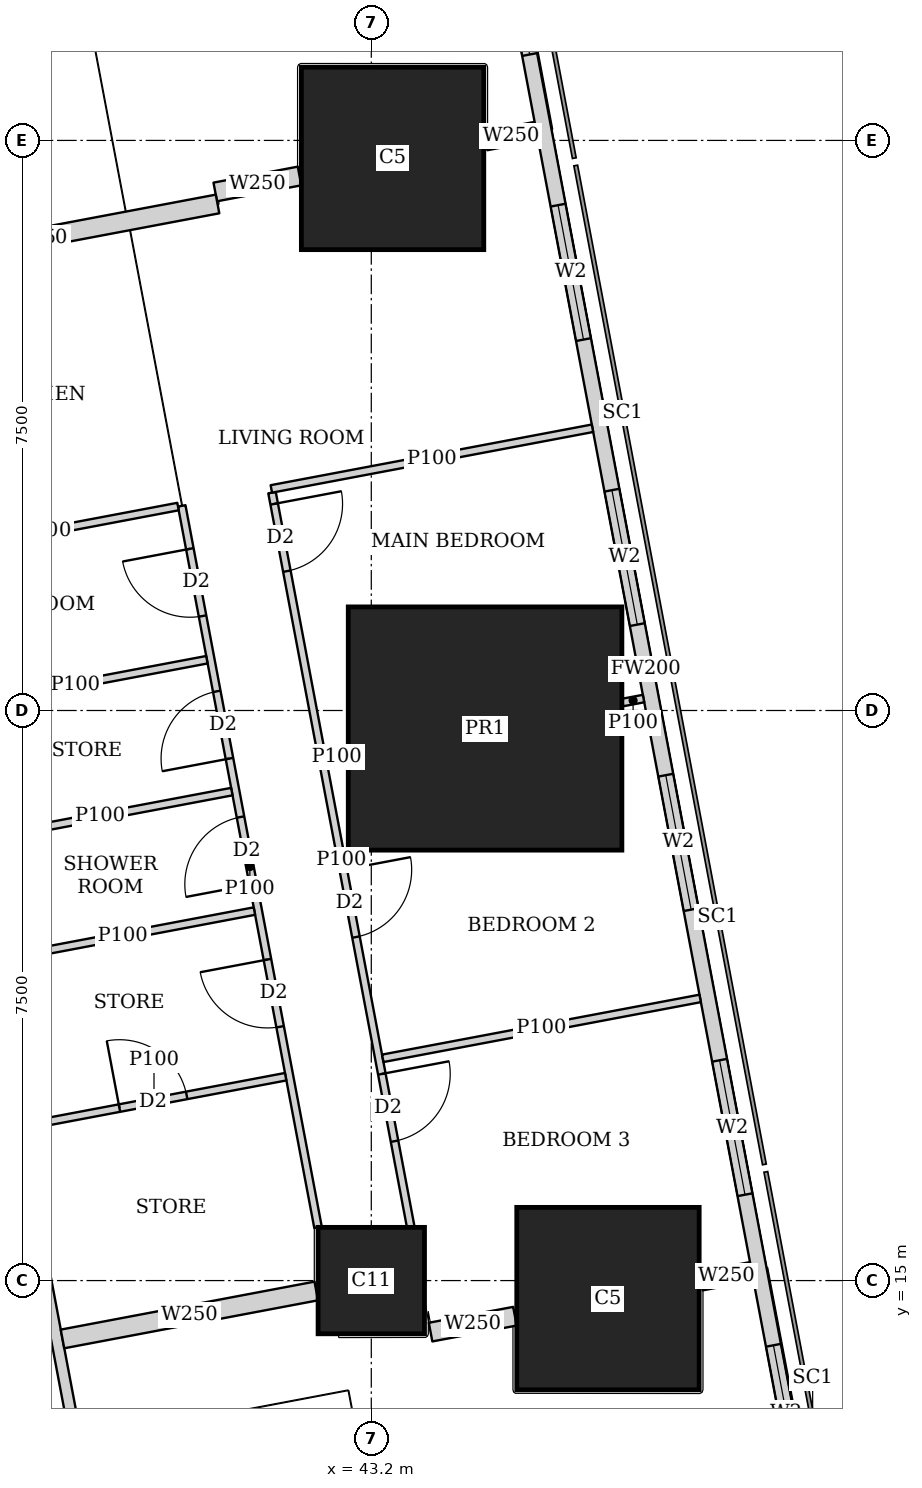
"""IFC4 building model, lengths in metres.
Left out: names, types, materials, properties, quantities, classifications, styles, units other than length and angle.
Written with IfcOpenShell. Run it as: python <this file> out.ifc"""

import sys

from ifc_helpers import new_model, si_unit, direction, frame, frame_2d, origin, origin_2d, place, context, subcontext, project, spatial, rectangle, extrude, element, fill, save


model = new_model("IFC4")
c1 = context("Model", 3, precision=1e-05, world=origin(), true_north=direction((0.0, 1.0)))
c2 = subcontext(c1, "Body", "Model", "MODEL_VIEW")
j1 = project(units=[si_unit("LENGTHUNIT", "METRE"), si_unit("PLANEANGLEUNIT", "RADIAN")], contexts=[c1])
p1 = place(None, origin())
s1 = spatial("IfcSite", under=j1, at=p1, CompositionType="ELEMENT")
p2 = place(p1, origin())
s2 = spatial("IfcBuilding", under=s1, at=p2, CompositionType="ELEMENT")
p3 = place(p2, frame((0.0, 0.0, 204.95)))
s3 = spatial("IfcBuildingStorey", under=s2, at=p3, CompositionType="ELEMENT", Elevation=204.95)
p4 = place(p3, frame((43.2, 15.0, 0.0), z_axis=(0.0, 0.0, 1.0), x_axis=(1.0, 0.0, 0.0)))
e1 = element("IfcColumn", 1, at=p4, inside=s3, PredefinedType="COLUMN", context=c2, shape_type="SweptSolid", body=[
    extrude(rectangle(XDim=1.4, YDim=1.4, at=origin_2d()), origin(), (0.0, 0.0, 1.0), 3.75),
])
p5 = place(p3, frame((46.314, 14.763, 0.0), z_axis=(0.0, 0.0, 1.0), x_axis=(1.0, 0.0, 0.0)))
e2 = element("IfcColumn", 2, at=p5, inside=s3, PredefinedType="COLUMN", context=c2, shape_type="SweptSolid", body=[
    extrude(rectangle(XDim=2.4, YDim=2.4, at=origin_2d()), origin(), (0.0, 0.0, 1.0), 3.75),
])
p6 = place(p3, frame((44.697, 22.263, 0.0), z_axis=(0.0, 0.0, 1.0), x_axis=(1.0, 0.0, 0.0)))
e3 = element("IfcColumn", 3, at=p6, inside=s3, PredefinedType="COLUMN", context=c2, shape_type="SweptSolid", body=[
    extrude(rectangle(XDim=3.6, YDim=3.2, at=origin_2d()), origin(), (0.0, 0.0, 1.0), 3.75),
])
p7 = place(p3, frame((43.48, 29.763, 0.0), z_axis=(0.0, 0.0, 1.0), x_axis=(1.0, 0.0, 0.0)))
e4 = element("IfcColumn", 4, at=p7, inside=s3, PredefinedType="COLUMN", context=c2, shape_type="SweptSolid", body=[
    extrude(rectangle(XDim=2.4, YDim=2.4, at=origin_2d()), origin(), (0.0, 0.0, 1.0), 3.75),
])
p8 = place(p3, frame((50.653, 2.703, 0.0), z_axis=(0.0, 0.0, 1.0), x_axis=(-0.185612026696, 0.982623109613, 0.0)))
e5 = element("IfcWall", 5, at=p8, inside=s3, PredefinedType="SOLIDWALL", context=c2, shape_type="SweptSolid", body=[
    extrude(rectangle(XDim=41.393, YDim=0.2, at=frame_2d((20.697, 0.0))), origin(), (0.0, 0.0, 1.0), 3.5),
])
p9 = place(p8, frame((1.633, 0.0, 0.9)))
e6 = element("IfcOpeningElement", 6, at=p9, cuts=e5, PredefinedType="OPENING", context=c2, shape_type="SweptSolid", body=[
    extrude(rectangle(XDim=1.8, YDim=1.5, at=frame_2d((0.9, 0.75))), frame((0.0, 0.11, 0.0), z_axis=(0.0, -1.0, 0.0), x_axis=(1.0, 0.0, 0.0)), (0.0, 0.0, 1.0), 0.22),
])
p10 = place(p8, frame((6.032, 0.0, 0.9)))
e7 = element("IfcOpeningElement", 7, at=p10, cuts=e5, PredefinedType="OPENING", context=c2, shape_type="SweptSolid", body=[
    extrude(rectangle(XDim=1.8, YDim=1.5, at=frame_2d((0.9, 0.75))), frame((0.0, 0.11, 0.0), z_axis=(0.0, -1.0, 0.0), x_axis=(1.0, 0.0, 0.0)), (0.0, 0.0, 1.0), 0.22),
])
p11 = place(p8, frame((9.848, 0.0, 0.9)))
e8 = element("IfcOpeningElement", 8, at=p11, cuts=e5, PredefinedType="OPENING", context=c2, shape_type="SweptSolid", body=[
    extrude(rectangle(XDim=1.8, YDim=1.5, at=frame_2d((0.9, 0.75))), frame((0.0, 0.11, 0.0), z_axis=(0.0, -1.0, 0.0), x_axis=(1.0, 0.0, 0.0)), (0.0, 0.0, 1.0), 0.22),
])
p12 = place(p8, frame((13.664, 0.0, 0.9)))
e9 = element("IfcOpeningElement", 9, at=p12, cuts=e5, PredefinedType="OPENING", context=c2, shape_type="SweptSolid", body=[
    extrude(rectangle(XDim=1.8, YDim=1.5, at=frame_2d((0.9, 0.75))), frame((0.0, 0.11, 0.0), z_axis=(0.0, -1.0, 0.0), x_axis=(1.0, 0.0, 0.0)), (0.0, 0.0, 1.0), 0.22),
])
p13 = place(p8, frame((17.481, 0.0, 0.9)))
e10 = element("IfcOpeningElement", 10, at=p13, cuts=e5, PredefinedType="OPENING", context=c2, shape_type="SweptSolid", body=[
    extrude(rectangle(XDim=1.8, YDim=1.5, at=frame_2d((0.9, 0.75))), frame((0.0, 0.11, 0.0), z_axis=(0.0, -1.0, 0.0), x_axis=(1.0, 0.0, 0.0)), (0.0, 0.0, 1.0), 0.22),
])
p14 = place(p8, frame((21.297, 0.0, 0.9)))
e11 = element("IfcOpeningElement", 11, at=p14, cuts=e5, PredefinedType="OPENING", context=c2, shape_type="SweptSolid", body=[
    extrude(rectangle(XDim=1.8, YDim=1.5, at=frame_2d((0.9, 0.75))), frame((0.0, 0.11, 0.0), z_axis=(0.0, -1.0, 0.0), x_axis=(1.0, 0.0, 0.0)), (0.0, 0.0, 1.0), 0.22),
])
p15 = place(p8, frame((25.113, 0.0, 0.9)))
e12 = element("IfcOpeningElement", 12, at=p15, cuts=e5, PredefinedType="OPENING", context=c2, shape_type="SweptSolid", body=[
    extrude(rectangle(XDim=1.8, YDim=1.5, at=frame_2d((0.9, 0.75))), frame((0.0, 0.11, 0.0), z_axis=(0.0, -1.0, 0.0), x_axis=(1.0, 0.0, 0.0)), (0.0, 0.0, 1.0), 0.22),
])
p16 = place(p8, frame((28.93, 0.0, 0.9)))
e13 = element("IfcOpeningElement", 13, at=p16, cuts=e5, PredefinedType="OPENING", context=c2, shape_type="SweptSolid", body=[
    extrude(rectangle(XDim=1.8, YDim=1.5, at=frame_2d((0.9, 0.75))), frame((0.0, 0.11, 0.0), z_axis=(0.0, -1.0, 0.0), x_axis=(1.0, 0.0, 0.0)), (0.0, 0.0, 1.0), 0.22),
])
p17 = place(p8, frame((32.746, 0.0, 0.9)))
e14 = element("IfcOpeningElement", 14, at=p17, cuts=e5, PredefinedType="OPENING", context=c2, shape_type="SweptSolid", body=[
    extrude(rectangle(XDim=1.8, YDim=1.5, at=frame_2d((0.9, 0.75))), frame((0.0, 0.11, 0.0), z_axis=(0.0, -1.0, 0.0), x_axis=(1.0, 0.0, 0.0)), (0.0, 0.0, 1.0), 0.22),
])
p18 = place(p8, frame((36.481, 0.0, 0.9)))
e15 = element("IfcOpeningElement", 15, at=p18, cuts=e5, PredefinedType="OPENING", context=c2, shape_type="SweptSolid", body=[
    extrude(rectangle(XDim=1.8, YDim=1.5, at=frame_2d((0.9, 0.75))), frame((0.0, 0.11, 0.0), z_axis=(0.0, -1.0, 0.0), x_axis=(1.0, 0.0, 0.0)), (0.0, 0.0, 1.0), 0.22),
])
p19 = place(p3, frame((33.68, 42.723, 0.0), z_axis=(0.0, 0.0, 1.0), x_axis=(0.185601160014, -0.982625162207, 0.0)))
e16 = element("IfcWall", 16, at=p19, inside=s3, PredefinedType="SOLIDWALL", context=c2, shape_type="SweptSolid", body=[
    extrude(rectangle(XDim=41.051, YDim=0.15, at=frame_2d((20.526, 0.0))), origin(), (0.0, 0.0, 1.0), 2.5),
])
p20 = place(p19, frame((12.307, 0.0, 0.0)))
e17 = element("IfcOpeningElement", 17, at=p20, cuts=e16, PredefinedType="OPENING", context=c2, shape_type="SweptSolid", body=[
    extrude(rectangle(XDim=1.0, YDim=2.1, at=frame_2d((0.5, 1.05))), frame((0.0, 0.085, 0.0), z_axis=(0.0, -1.0, 0.0), x_axis=(1.0, 0.0, 0.0)), (0.0, 0.0, 1.0), 0.17),
])
p21 = place(p19, frame((16.123, 0.0, 0.0)))
e18 = element("IfcOpeningElement", 18, at=p21, cuts=e16, PredefinedType="OPENING", context=c2, shape_type="SweptSolid", body=[
    extrude(rectangle(XDim=1.0, YDim=2.1, at=frame_2d((0.5, 1.05))), frame((0.0, 0.085, 0.0), z_axis=(0.0, -1.0, 0.0), x_axis=(1.0, 0.0, 0.0)), (0.0, 0.0, 1.0), 0.17),
])
p22 = place(p19, frame((30.902, 0.0, 0.0)))
e19 = element("IfcOpeningElement", 19, at=p22, cuts=e16, PredefinedType="OPENING", context=c2, shape_type="SweptSolid", body=[
    extrude(rectangle(XDim=1.0, YDim=2.1, at=frame_2d((0.5, 1.05))), frame((0.0, 0.085, 0.0), z_axis=(0.0, -1.0, 0.0), x_axis=(1.0, 0.0, 0.0)), (0.0, 0.0, 1.0), 0.17),
])
p23 = place(p3, frame((41.894, 25.366, 0.0), z_axis=(0.0, 0.0, 1.0), x_axis=(0.185612905165, -0.982622943675, 0.0)))
e20 = element("IfcWall", 20, at=p23, inside=s3, PredefinedType="PARTITIONING", context=c2, shape_type="SweptSolid", body=[
    extrude(rectangle(XDim=9.827, YDim=0.1, at=frame_2d((4.913, 0.0))), origin(), (0.0, 0.0, 1.0), 2.5),
])
p24 = place(p23, frame((0.151, 0.0, 0.0)))
e21 = element("IfcOpeningElement", 21, at=p24, cuts=e20, PredefinedType="OPENING", context=c2, shape_type="SweptSolid", body=[
    extrude(rectangle(XDim=0.9, YDim=2.1, at=frame_2d((0.45, 1.05))), frame((0.0, 0.06, 0.0), z_axis=(0.0, -1.0, 0.0), x_axis=(1.0, 0.0, 0.0)), (0.0, 0.0, 1.0), 0.12),
])
p25 = place(p23, frame((5.05, 0.0, 0.0)))
e22 = element("IfcOpeningElement", 22, at=p25, cuts=e20, PredefinedType="OPENING", context=c2, shape_type="SweptSolid", body=[
    extrude(rectangle(XDim=0.9, YDim=2.1, at=frame_2d((0.45, 1.05))), frame((0.0, 0.06, 0.0), z_axis=(0.0, -1.0, 0.0), x_axis=(1.0, 0.0, 0.0)), (0.0, 0.0, 1.0), 0.12),
])
p26 = place(p23, frame((7.783, 0.0, 0.0)))
e23 = element("IfcOpeningElement", 23, at=p26, cuts=e20, PredefinedType="OPENING", context=c2, shape_type="SweptSolid", body=[
    extrude(rectangle(XDim=0.9, YDim=2.1, at=frame_2d((0.45, 1.05))), frame((0.0, 0.06, 0.0), z_axis=(0.0, -1.0, 0.0), x_axis=(1.0, 0.0, 0.0)), (0.0, 0.0, 1.0), 0.12),
])
p27 = place(p3, frame((40.706, 25.192, 0.0), z_axis=(0.0, 0.0, 1.0), x_axis=(0.185629824463, -0.982619747547, 0.0)))
e24 = element("IfcWall", 24, at=p27, inside=s3, PredefinedType="PARTITIONING", context=c2, shape_type="SweptSolid", body=[
    extrude(rectangle(XDim=9.659, YDim=0.1, at=frame_2d((4.83, 0.0))), origin(), (0.0, 0.0, 1.0), 2.5),
])
p28 = place(p27, frame((0.575, 0.0, 0.0)))
e25 = element("IfcOpeningElement", 25, at=p28, cuts=e24, PredefinedType="OPENING", context=c2, shape_type="SweptSolid", body=[
    extrude(rectangle(XDim=0.9, YDim=2.1, at=frame_2d((0.45, 1.05))), frame((0.0, 0.06, 0.0), z_axis=(0.0, -1.0, 0.0), x_axis=(1.0, 0.0, 0.0)), (0.0, 0.0, 1.0), 0.12),
])
p29 = place(p27, frame((4.166, 0.0, 0.0)))
e26 = element("IfcOpeningElement", 26, at=p29, cuts=e24, PredefinedType="OPENING", context=c2, shape_type="SweptSolid", body=[
    extrude(rectangle(XDim=0.9, YDim=2.1, at=frame_2d((0.45, 1.05))), frame((0.0, 0.06, 0.0), z_axis=(0.0, -1.0, 0.0), x_axis=(1.0, 0.0, 0.0)), (0.0, 0.0, 1.0), 0.12),
])
p30 = place(p27, frame((2.483, 0.0, 0.0)))
e27 = element("IfcOpeningElement", 27, at=p30, cuts=e24, PredefinedType="OPENING", context=c2, shape_type="SweptSolid", body=[
    extrude(rectangle(XDim=0.9, YDim=2.1, at=frame_2d((0.45, 1.05))), frame((0.0, 0.06, 0.0), z_axis=(0.0, -1.0, 0.0), x_axis=(1.0, 0.0, 0.0)), (0.0, 0.0, 1.0), 0.12),
])
p31 = place(p27, frame((6.074, 0.0, 0.0)))
e28 = element("IfcOpeningElement", 28, at=p31, cuts=e24, PredefinedType="OPENING", context=c2, shape_type="SweptSolid", body=[
    extrude(rectangle(XDim=0.9, YDim=2.1, at=frame_2d((0.45, 1.05))), frame((0.0, 0.06, 0.0), z_axis=(0.0, -1.0, 0.0), x_axis=(1.0, 0.0, 0.0)), (0.0, 0.0, 1.0), 0.12),
])
p32 = place(p3, frame((46.11, 26.213, 0.0), z_axis=(0.0, 0.0, 1.0), x_axis=(-0.982633535512, -0.185556823879, 0.0)))
e29 = element("IfcWall", 29, at=p32, inside=s3, PredefinedType="PARTITIONING", context=c2, shape_type="SweptSolid", body=[
    extrude(rectangle(XDim=4.3, YDim=0.1, at=frame_2d((2.15, 0.0))), origin(), (0.0, 0.0, 1.0), 2.05),
])
p33 = place(p3, frame((46.782, 22.657, 0.0), z_axis=(0.0, 0.0, 1.0), x_axis=(-0.982574553168, -0.185868898601, 0.0)))
e30 = element("IfcWall", 30, at=p33, inside=s3, PredefinedType="PARTITIONING", context=c2, shape_type="SweptSolid", body=[
    extrude(rectangle(XDim=0.28, YDim=0.1, at=frame_2d((0.14, 0.0))), origin(), (0.0, 0.0, 1.0), 3.5),
])
p34 = place(p3, frame((42.887, 21.921, 0.0), z_axis=(0.0, 0.0, 1.0), x_axis=(-0.982688058078, -0.185267861514, 0.0)))
e31 = element("IfcWall", 31, at=p34, inside=s3, PredefinedType="PARTITIONING", context=c2, shape_type="SweptSolid", body=[
    extrude(rectangle(XDim=0.286, YDim=0.1, at=frame_2d((0.143, 0.0))), origin(), (0.0, 0.0, 1.0), 2.5),
])
p35 = place(p3, frame((47.527, 18.712, 0.0), z_axis=(0.0, 0.0, 1.0), x_axis=(-0.982665405803, -0.185387972203, 0.0)))
e32 = element("IfcWall", 32, at=p35, inside=s3, PredefinedType="PARTITIONING", context=c2, shape_type="SweptSolid", body=[
    extrude(rectangle(XDim=4.25, YDim=0.1, at=frame_2d((2.125, 0.0))), origin(), (0.0, 0.0, 1.0), 2.05),
])
p36 = place(p3, frame((40.657, 25.183, 0.0), z_axis=(0.0, 0.0, 1.0), x_axis=(-0.982585626838, -0.185810349366, 0.0)))
e33 = element("IfcWall", 33, at=p36, inside=s3, PredefinedType="PARTITIONING", context=c2, shape_type="SweptSolid", body=[
    extrude(rectangle(XDim=3.525, YDim=0.1, at=frame_2d((1.763, 0.0))), origin(), (0.0, 0.0, 1.0), 3.5),
])
p37 = place(p3, frame((41.365, 21.433, 0.0), z_axis=(0.0, 0.0, 1.0), x_axis=(-0.982638553676, -0.185530247748, 0.0)))
e34 = element("IfcWall", 34, at=p37, inside=s3, PredefinedType="PARTITIONING", context=c2, shape_type="SweptSolid", body=[
    extrude(rectangle(XDim=3.525, YDim=0.1, at=frame_2d((1.763, 0.0))), origin(), (0.0, 0.0, 1.0), 3.5),
])
p38 = place(p3, frame((42.073, 17.682, 0.0), z_axis=(0.0, 0.0, 1.0), x_axis=(-0.98265117712, -0.185463376723, 0.0)))
e35 = element("IfcWall", 35, at=p38, inside=s3, PredefinedType="PARTITIONING", context=c2, shape_type="SweptSolid", body=[
    extrude(rectangle(XDim=3.525, YDim=0.1, at=frame_2d((1.763, 0.0))), origin(), (0.0, 0.0, 1.0), 3.5),
])
p39 = place(p38, frame((1.325, 0.0, 0.0)))
e36 = element("IfcOpeningElement", 36, at=p39, cuts=e35, PredefinedType="OPENING", context=c2, shape_type="SweptSolid", body=[
    extrude(rectangle(XDim=0.9, YDim=2.1, at=frame_2d((0.45, 1.05))), frame((0.0, 0.06, 0.0), z_axis=(0.0, -1.0, 0.0), x_axis=(1.0, 0.0, 0.0)), (0.0, 0.0, 1.0), 0.12),
])
p40 = place(p3, frame((41.037, 23.168, 0.0), z_axis=(0.0, 0.0, 1.0), x_axis=(-0.982638553676, -0.185530247748, 0.0)))
e37 = element("IfcWall", 37, at=p40, inside=s3, PredefinedType="PARTITIONING", context=c2, shape_type="SweptSolid", body=[
    extrude(rectangle(XDim=3.525, YDim=0.1, at=frame_2d((1.763, 0.0))), origin(), (0.0, 0.0, 1.0), 2.5),
])
p41 = place(p3, frame((41.662, 19.861, 0.0), z_axis=(0.0, 0.0, 1.0), x_axis=(-0.982588017646, -0.185797706064, 0.0)))
e38 = element("IfcWall", 38, at=p41, inside=s3, PredefinedType="PARTITIONING", context=c2, shape_type="SweptSolid", body=[
    extrude(rectangle(XDim=3.525, YDim=0.1, at=frame_2d((1.763, 0.0))), origin(), (0.0, 0.0, 1.0), 3.5),
])
p42 = place(p3, frame((45.372, 30.121, 0.0), z_axis=(0.0, 0.0, 1.0), x_axis=(-0.982347993061, -0.187062611252, 0.0)))
e39 = element("IfcWall", 39, at=p42, inside=s3, PredefinedType="SOLIDWALL", context=c2, shape_type="SweptSolid", body=[
    extrude(rectangle(XDim=0.68, YDim=0.25, at=frame_2d((0.34, 0.0))), origin(), (0.0, 0.0, 1.0), 2.05),
])
p43 = place(p3, frame((42.256, 29.532, 0.0), z_axis=(0.0, 0.0, 1.0), x_axis=(-0.982549954272, -0.185998890749, 0.0)))
e40 = element("IfcWall", 40, at=p43, inside=s3, PredefinedType="SOLIDWALL", context=c2, shape_type="SweptSolid", body=[
    extrude(rectangle(XDim=1.129, YDim=0.25, at=frame_2d((0.564, 0.0))), origin(), (0.0, 0.0, 1.0), 2.05),
])
p44 = place(p3, frame((41.177, 29.164, 0.0), z_axis=(0.0, 0.0, 1.0), x_axis=(-0.982642846239, -0.185507511263, 0.0)))
e41 = element("IfcWall", 41, at=p44, inside=s3, PredefinedType="SOLIDWALL", context=c2, shape_type="SweptSolid", body=[
    extrude(rectangle(XDim=4.776, YDim=0.25, at=frame_2d((2.388, 0.0))), origin(), (0.0, 0.0, 1.0), 2.5),
])
p45 = place(p3, frame((48.206, 15.12, 0.0), z_axis=(0.0, 0.0, 1.0), x_axis=(-0.982610999048, -0.18567612811, 0.0)))
e42 = element("IfcWall", 42, at=p45, inside=s3, PredefinedType="SOLIDWALL", context=c2, shape_type="SweptSolid", body=[
    extrude(rectangle(XDim=0.68, YDim=0.25, at=frame_2d((0.34, 0.0))), origin(), (0.0, 0.0, 1.0), 2.05),
])
p46 = place(p3, frame((45.09, 14.531, 0.0), z_axis=(0.0, 0.0, 1.0), x_axis=(-0.982737354171, -0.185006196431, 0.0)))
e43 = element("IfcWall", 43, at=p46, inside=s3, PredefinedType="SOLIDWALL", context=c2, shape_type="SweptSolid", body=[
    extrude(rectangle(XDim=1.13, YDim=0.25, at=frame_2d((0.565, 0.0))), origin(), (0.0, 0.0, 1.0), 2.05),
])
p47 = place(p3, frame((42.476, 14.863, 0.0), z_axis=(0.0, 0.0, 1.0), x_axis=(-0.982603567712, -0.185715450942, 0.0)))
e44 = element("IfcWall", 44, at=p47, inside=s3, PredefinedType="SOLIDWALL", context=c2, shape_type="SweptSolid", body=[
    extrude(rectangle(XDim=3.398, YDim=0.25, at=frame_2d((1.699, 0.0))), origin(), (0.0, 0.0, 1.0), 3.5),
])
p48 = place(p11, origin())
e45 = element("IfcWindow", 45, at=p48, inside=s3, PartitioningType="SINGLE_PANEL", PredefinedType="WINDOW", context=c2, shape_type="SweptSolid", body=[
    extrude(rectangle(XDim=1.8, YDim=1.5, at=frame_2d((0.9, 0.75))), frame((0.0, 0.03, 0.0), z_axis=(0.0, -1.0, 0.0), x_axis=(1.0, 0.0, 0.0)), (0.0, 0.0, 1.0), 0.06),
])
fill(e8, e45)
p49 = place(p12, origin())
e46 = element("IfcWindow", 46, at=p49, inside=s3, PartitioningType="SINGLE_PANEL", PredefinedType="WINDOW", context=c2, shape_type="SweptSolid", body=[
    extrude(rectangle(XDim=1.8, YDim=1.5, at=frame_2d((0.9, 0.75))), frame((0.0, 0.03, 0.0), z_axis=(0.0, -1.0, 0.0), x_axis=(1.0, 0.0, 0.0)), (0.0, 0.0, 1.0), 0.06),
])
fill(e9, e46)
p50 = place(p13, origin())
e47 = element("IfcWindow", 47, at=p50, inside=s3, PartitioningType="SINGLE_PANEL", PredefinedType="WINDOW", context=c2, shape_type="SweptSolid", body=[
    extrude(rectangle(XDim=1.8, YDim=1.5, at=frame_2d((0.9, 0.75))), frame((0.0, 0.03, 0.0), z_axis=(0.0, -1.0, 0.0), x_axis=(1.0, 0.0, 0.0)), (0.0, 0.0, 1.0), 0.06),
])
fill(e10, e47)
p51 = place(p14, origin())
e48 = element("IfcWindow", 48, at=p51, inside=s3, PartitioningType="SINGLE_PANEL", PredefinedType="WINDOW", context=c2, shape_type="SweptSolid", body=[
    extrude(rectangle(XDim=1.8, YDim=1.5, at=frame_2d((0.9, 0.75))), frame((0.0, 0.03, 0.0), z_axis=(0.0, -1.0, 0.0), x_axis=(1.0, 0.0, 0.0)), (0.0, 0.0, 1.0), 0.06),
])
fill(e11, e48)
p52 = place(p15, origin())
e49 = element("IfcWindow", 49, at=p52, inside=s3, PartitioningType="SINGLE_PANEL", PredefinedType="WINDOW", context=c2, shape_type="SweptSolid", body=[
    extrude(rectangle(XDim=1.8, YDim=1.5, at=frame_2d((0.9, 0.75))), frame((0.0, 0.03, 0.0), z_axis=(0.0, -1.0, 0.0), x_axis=(1.0, 0.0, 0.0)), (0.0, 0.0, 1.0), 0.06),
])
fill(e12, e49)
p53 = place(p16, origin())
e50 = element("IfcWindow", 50, at=p53, inside=s3, PartitioningType="SINGLE_PANEL", PredefinedType="WINDOW", context=c2, shape_type="SweptSolid", body=[
    extrude(rectangle(XDim=1.8, YDim=1.5, at=frame_2d((0.9, 0.75))), frame((0.0, 0.03, 0.0), z_axis=(0.0, -1.0, 0.0), x_axis=(1.0, 0.0, 0.0)), (0.0, 0.0, 1.0), 0.06),
])
fill(e13, e50)
p54 = place(p24, origin())
e51 = element("IfcDoor", 51, at=p54, inside=s3, OperationType="SINGLE_SWING_LEFT", PredefinedType="DOOR", context=c2, shape_type="SweptSolid", body=[
    extrude(rectangle(XDim=0.9, YDim=2.1, at=frame_2d((0.45, 1.05))), frame((0.0, 0.025, 0.0), z_axis=(0.0, -1.0, 0.0), x_axis=(1.0, 0.0, 0.0)), (0.0, 0.0, 1.0), 0.05),
])
fill(e21, e51)
p55 = place(p25, origin())
e52 = element("IfcDoor", 52, at=p55, inside=s3, OperationType="SINGLE_SWING_LEFT", PredefinedType="DOOR", context=c2, shape_type="SweptSolid", body=[
    extrude(rectangle(XDim=0.9, YDim=2.1, at=frame_2d((0.45, 1.05))), frame((0.0, 0.025, 0.0), z_axis=(0.0, -1.0, 0.0), x_axis=(1.0, 0.0, 0.0)), (0.0, 0.0, 1.0), 0.05),
])
fill(e22, e52)
p56 = place(p26, origin())
e53 = element("IfcDoor", 53, at=p56, inside=s3, OperationType="SINGLE_SWING_LEFT", PredefinedType="DOOR", context=c2, shape_type="SweptSolid", body=[
    extrude(rectangle(XDim=0.9, YDim=2.1, at=frame_2d((0.45, 1.05))), frame((0.0, 0.025, 0.0), z_axis=(0.0, -1.0, 0.0), x_axis=(1.0, 0.0, 0.0)), (0.0, 0.0, 1.0), 0.05),
])
fill(e23, e53)
p57 = place(p28, origin())
e54 = element("IfcDoor", 54, at=p57, inside=s3, OperationType="SINGLE_SWING_RIGHT", PredefinedType="DOOR", context=c2, shape_type="SweptSolid", body=[
    extrude(rectangle(XDim=0.9, YDim=2.1, at=frame_2d((0.45, 1.05))), frame((0.0, 0.025, 0.0), z_axis=(0.0, -1.0, 0.0), x_axis=(1.0, 0.0, 0.0)), (0.0, 0.0, 1.0), 0.05),
])
fill(e25, e54)
p58 = place(p29, origin())
e55 = element("IfcDoor", 55, at=p58, inside=s3, OperationType="SINGLE_SWING_LEFT", PredefinedType="DOOR", context=c2, shape_type="SweptSolid", body=[
    extrude(rectangle(XDim=0.9, YDim=2.1, at=frame_2d((0.45, 1.05))), frame((0.0, 0.025, 0.0), z_axis=(0.0, -1.0, 0.0), x_axis=(1.0, 0.0, 0.0)), (0.0, 0.0, 1.0), 0.05),
])
fill(e26, e55)
p59 = place(p30, origin())
e56 = element("IfcDoor", 56, at=p59, inside=s3, OperationType="SINGLE_SWING_LEFT", PredefinedType="DOOR", context=c2, shape_type="SweptSolid", body=[
    extrude(rectangle(XDim=0.9, YDim=2.1, at=frame_2d((0.45, 1.05))), frame((0.0, 0.025, 0.0), z_axis=(0.0, -1.0, 0.0), x_axis=(1.0, 0.0, 0.0)), (0.0, 0.0, 1.0), 0.05),
])
fill(e27, e56)
p60 = place(p31, origin())
e57 = element("IfcDoor", 57, at=p60, inside=s3, OperationType="SINGLE_SWING_RIGHT", PredefinedType="DOOR", context=c2, shape_type="SweptSolid", body=[
    extrude(rectangle(XDim=0.9, YDim=2.1, at=frame_2d((0.45, 1.05))), frame((0.0, 0.025, 0.0), z_axis=(0.0, -1.0, 0.0), x_axis=(1.0, 0.0, 0.0)), (0.0, 0.0, 1.0), 0.05),
])
fill(e28, e57)
p61 = place(p39, origin())
e58 = element("IfcDoor", 58, at=p61, inside=s3, OperationType="SINGLE_SWING_LEFT", PredefinedType="DOOR", context=c2, shape_type="SweptSolid", body=[
    extrude(rectangle(XDim=0.9, YDim=2.1, at=frame_2d((0.45, 1.05))), frame((0.0, 0.025, 0.0), z_axis=(0.0, -1.0, 0.0), x_axis=(1.0, 0.0, 0.0)), (0.0, 0.0, 1.0), 0.05),
])
fill(e36, e58)
save(model, sys.argv[1])
